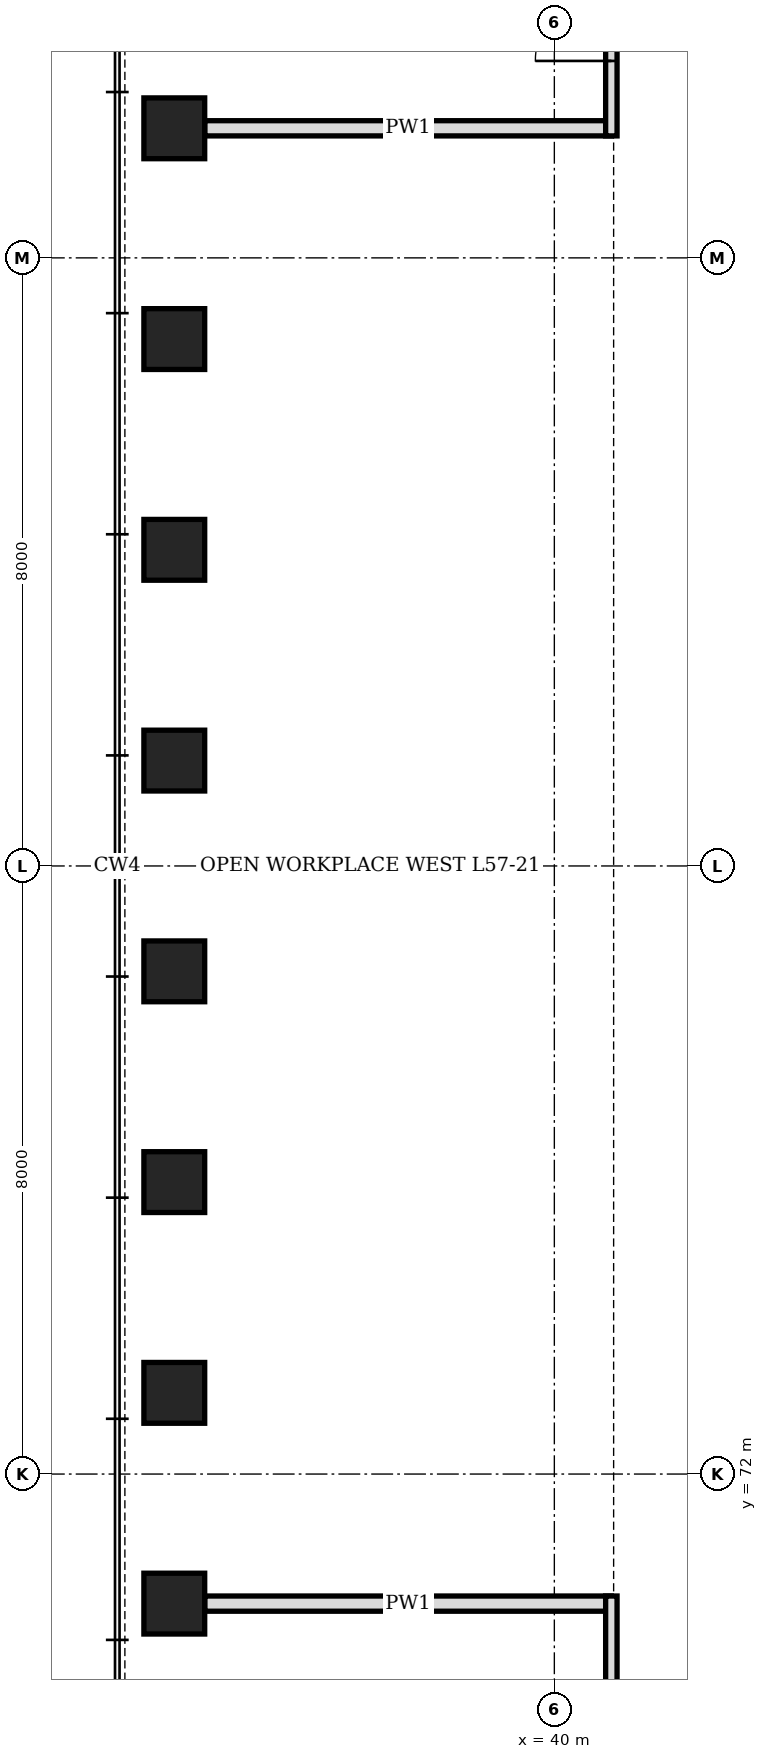
"""IFC4 building model, lengths in metres.
Left out: names, types, materials, properties, quantities, classifications, styles, units other than length and angle.
Written with IfcOpenShell. Run it as: python <this file> out.ifc"""

import sys

from ifc_helpers import new_model, si_unit, direction, frame, frame_2d, origin, origin_2d, place, context, subcontext, project, spatial, rectangle, hollow_rectangle, extrude, element, fill, save


model = new_model("IFC4")
c1 = context("Model", 3, precision=1e-05, world=origin(), true_north=direction((0.0, 1.0)))
c2 = subcontext(c1, "Body", "Model", "MODEL_VIEW")
j1 = project(units=[si_unit("LENGTHUNIT", "METRE"), si_unit("PLANEANGLEUNIT", "RADIAN")], contexts=[c1])
p1 = place(None, origin())
s1 = spatial("IfcSite", under=j1, at=p1, CompositionType="ELEMENT")
p2 = place(p1, origin())
s2 = spatial("IfcBuilding", under=s1, at=p2, CompositionType="ELEMENT")
p3 = place(p2, frame((0.0, 0.0, 254.5)))
s3 = spatial("IfcBuildingStorey", under=s2, at=p3, CompositionType="ELEMENT", Elevation=254.5)
for number, where, z_axis, x_axis in (
    (1, (35.0, 89.705, 0.0), (0.0, 0.0, 1.0), (0.0, 1.0, 0.0)),
    (2, (35.0, 86.932, 0.0), (0.0, 0.0, 1.0), (0.0, 1.0, 0.0)),
    (3, (35.0, 84.159, 0.0), (0.0, 0.0, 1.0), (0.0, 1.0, 0.0)),
    (4, (35.0, 81.386, 0.0), (0.0, 0.0, 1.0), (0.0, 1.0, 0.0)),
    (5, (35.0, 78.614, 0.0), (0.0, 0.0, 1.0), (0.0, 1.0, 0.0)),
    (6, (35.0, 75.841, 0.0), (0.0, 0.0, 1.0), (0.0, 1.0, 0.0)),
    (7, (35.0, 73.068, 0.0), (0.0, 0.0, 1.0), (0.0, 1.0, 0.0)),
    (8, (35.0, 70.295, 0.0), (0.0, 0.0, 1.0), (0.0, 1.0, 0.0)),
):
    element("IfcColumn", number, at=place(p3, frame(where, z_axis=z_axis, x_axis=x_axis)), inside=s3, PredefinedType="COLUMN", context=c2, shape_type="SweptSolid", body=[
        extrude(hollow_rectangle(XDim=0.8, YDim=0.8, WallThickness=0.1, at=origin_2d()), origin(), (0.0, 0.0, 1.0), 4.2),
    ])
for number, where, z_axis, x_axis in (
    (9, (35.4, 70.295, 0.0), (0.0, 0.0, 1.0), (1.0, 0.0, 0.0)),
    (10, (35.4, 89.705, 0.0), (0.0, 0.0, 1.0), (1.0, 0.0, 0.0)),
):
    element("IfcWall", number, at=place(p3, frame(where, z_axis=z_axis, x_axis=x_axis)), inside=s3, PredefinedType="PARTITIONING", context=c2, shape_type="SweptSolid", body=[
        extrude(rectangle(XDim=5.35, YDim=0.2, at=frame_2d((2.675, 0.0))), origin(), (0.0, 0.0, 1.0), 3.428),
    ])
p4 = place(p3, frame((40.75, 65.15, 0.0), z_axis=(0.0, 0.0, 1.0), x_axis=(0.0, 1.0, 0.0)))
e11 = element("IfcWall", 11, at=p4, inside=s3, PredefinedType="PARTITIONING", context=c2, shape_type="SweptSolid", body=[
    extrude(rectangle(XDim=5.246, YDim=0.15, at=frame_2d((2.623, 0.0))), origin(), (0.0, 0.0, 1.0), 4.04),
])
p5 = place(p4, frame((0.486, 0.0, 0.0)))
e12 = element("IfcOpeningElement", 12, at=p5, cuts=e11, PredefinedType="OPENING", context=c2, shape_type="SweptSolid", body=[
    extrude(rectangle(XDim=1.0, YDim=2.1, at=frame_2d((0.5, 1.05))), frame((0.0, 0.085, 0.0), z_axis=(0.0, -1.0, 0.0), x_axis=(1.0, 0.0, 0.0)), (0.0, 0.0, 1.0), 0.17),
])
p6 = place(p3, frame((40.75, 89.604, 0.0), z_axis=(0.0, 0.0, 1.0), x_axis=(0.0, 1.0, 0.0)))
e13 = element("IfcWall", 13, at=p6, inside=s3, PredefinedType="PARTITIONING", context=c2, shape_type="SweptSolid", body=[
    extrude(rectangle(XDim=5.246, YDim=0.15, at=frame_2d((2.623, 0.0))), origin(), (0.0, 0.0, 1.0), 4.04),
])
p7 = place(p6, frame((0.986, 0.0, 0.0)))
e14 = element("IfcOpeningElement", 14, at=p7, cuts=e13, PredefinedType="OPENING", context=c2, shape_type="SweptSolid", body=[
    extrude(rectangle(XDim=1.0, YDim=2.1, at=frame_2d((0.5, 1.05))), frame((0.0, 0.085, 0.0), z_axis=(0.0, -1.0, 0.0), x_axis=(1.0, 0.0, 0.0)), (0.0, 0.0, 1.0), 0.17),
])
p8 = place(p7, origin())
e15 = element("IfcDoor", 15, at=p8, inside=s3, OperationType="SINGLE_SWING_LEFT", PredefinedType="DOOR", context=c2, shape_type="SweptSolid", body=[
    extrude(rectangle(XDim=1.0, YDim=2.1, at=frame_2d((0.5, 1.05))), frame((0.0, 0.075, 0.0), z_axis=(0.0, -1.0, 0.0), x_axis=(1.0, 0.0, 0.0)), (0.0, 0.0, 1.0), 0.149),
])
fill(e14, e15)
save(model, sys.argv[1])
